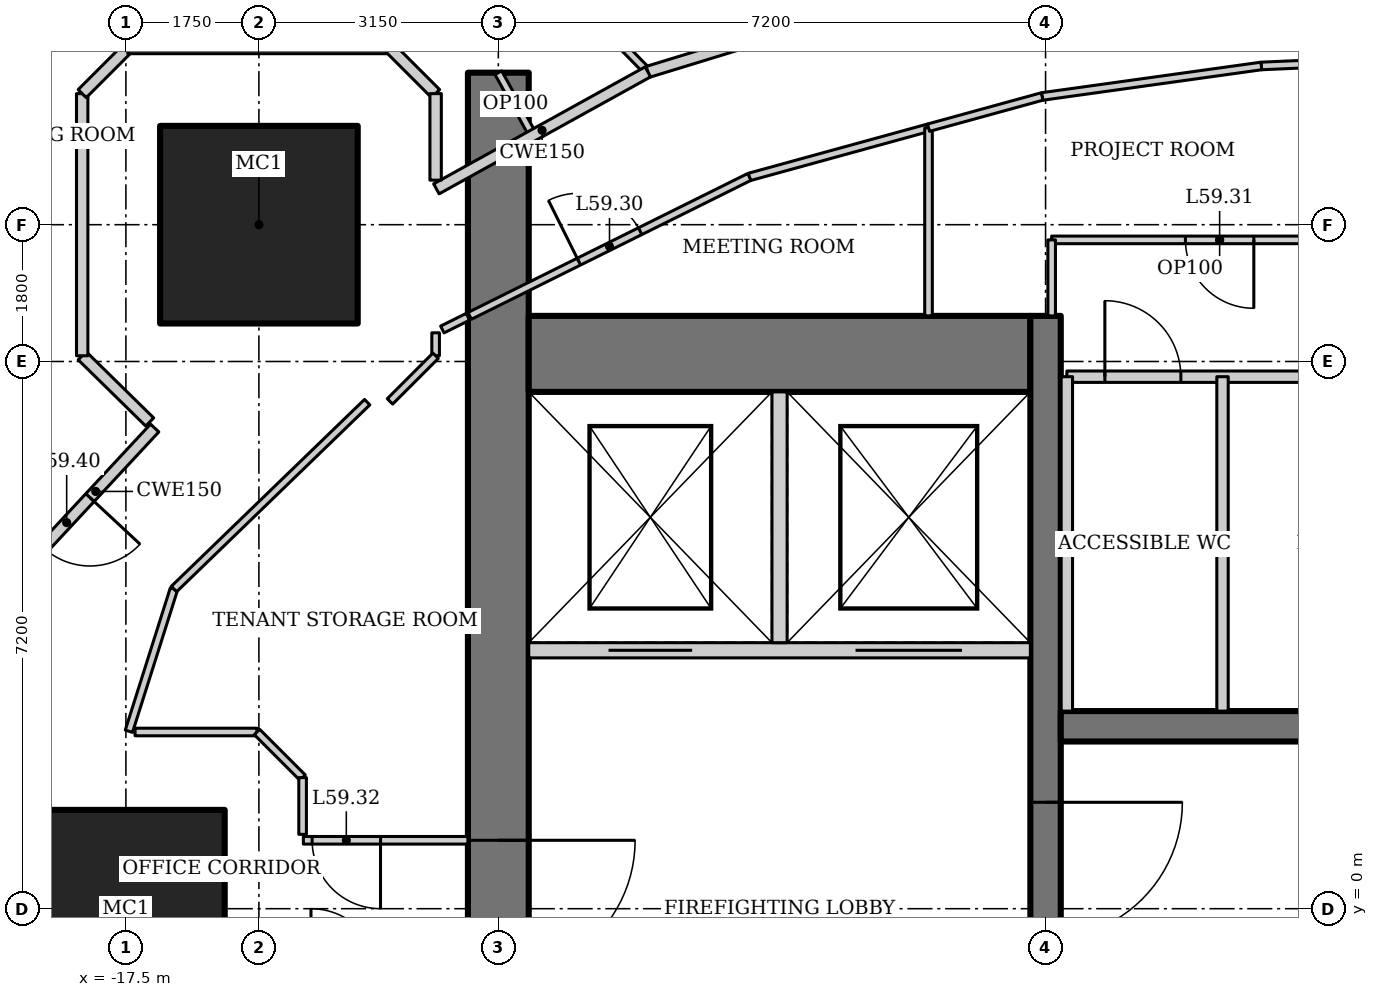
"""IFC4 building model, lengths in metres.
Left out: names, types, materials, properties, quantities, classifications, styles, units other than length and angle.
Written with IfcOpenShell. Run it as: python <this file> out.ifc"""

import sys

from ifc_helpers import new_model, si_unit, direction, frame, frame_2d, origin, origin_2d, place, context, subcontext, project, spatial, rectangle, hollow_rectangle, extrude, element, fill, save


model = new_model("IFC4")
c1 = context("Model", 3, precision=1e-05, world=origin(), true_north=direction((0.0, 1.0)))
c2 = subcontext(c1, "Body", "Model", "MODEL_VIEW")
j1 = project(units=[si_unit("LENGTHUNIT", "METRE"), si_unit("PLANEANGLEUNIT", "RADIAN")], contexts=[c1])
p1 = place(None, origin())
s1 = spatial("IfcSite", under=j1, at=p1, CompositionType="ELEMENT")
p2 = place(p1, origin())
s2 = spatial("IfcBuilding", under=s1, at=p2, CompositionType="ELEMENT")
p3 = place(p2, frame((0.0, 0.0, 253.6)))
s3 = spatial("IfcBuildingStorey", under=s2, at=p3, CompositionType="ELEMENT", Elevation=253.6)
for number, where, z_axis, x_axis in (
    (1, (-15.75, 9.0, 0.0), (0.0, 0.0, 1.0), (1.0, 0.0, 0.0)),
    (2, (-17.5, 0.0, 0.0), (0.0, 0.0, 1.0), (1.0, 0.0, 0.0)),
):
    element("IfcColumn", number, at=place(p3, frame(where, z_axis=z_axis, x_axis=x_axis)), inside=s3, PredefinedType="COLUMN", context=c2, shape_type="SweptSolid", body=[
        extrude(hollow_rectangle(XDim=2.6, YDim=2.6, WallThickness=0.13, at=origin_2d()), origin(), (0.0, 0.0, 1.0), 4.2),
    ])
p4 = place(p3, frame((-12.6, 11.0, 0.0), z_axis=(0.0, 0.0, 1.0), x_axis=(0.0, -1.0, 0.0)))
e3 = element("IfcWall", 3, at=p4, inside=s3, PredefinedType="SHEAR", context=c2, shape_type="SweptSolid", body=[
    extrude(rectangle(XDim=22.0, YDim=0.8, at=frame_2d((11.0, 0.0))), origin(), (0.0, 0.0, 1.0), 4.2),
])
p5 = place(p4, frame((10.1, 0.0, 0.0)))
e4 = element("IfcOpeningElement", 4, at=p5, cuts=e3, PredefinedType="OPENING", context=c2, shape_type="SweptSolid", body=[
    extrude(rectangle(XDim=1.8, YDim=2.1, at=frame_2d((0.9, 1.05))), frame((0.0, 0.41, 0.0), z_axis=(0.0, -1.0, 0.0), x_axis=(1.0, 0.0, 0.0)), (0.0, 0.0, 1.0), 0.82),
])
p6 = place(p3, frame((-5.6, 7.3, 0.0), z_axis=(0.0, 0.0, 1.0), x_axis=(-1.0, 0.0, 0.0)))
e5 = element("IfcWall", 5, at=p6, inside=s3, PredefinedType="SHEAR", context=c2, shape_type="SweptSolid", body=[
    extrude(rectangle(XDim=6.6, YDim=1.0, at=frame_2d((3.3, 0.0))), origin(), (0.0, 0.0, 1.0), 4.2),
])
p7 = place(p3, frame((-5.4, 7.8, 0.0), z_axis=(0.0, 0.0, 1.0), x_axis=(0.0, -1.0, 0.0)))
e6 = element("IfcWall", 6, at=p7, inside=s3, PredefinedType="SHEAR", context=c2, shape_type="SweptSolid", body=[
    extrude(rectangle(XDim=14.6, YDim=0.4, at=frame_2d((7.3, 0.0))), origin(), (0.0, 0.0, 1.0), 4.2),
])
p8 = place(p7, frame((6.4, 0.0, 0.0)))
e7 = element("IfcOpeningElement", 7, at=p8, cuts=e6, PredefinedType="OPENING", context=c2, shape_type="SweptSolid", body=[
    extrude(rectangle(XDim=1.8, YDim=2.1, at=frame_2d((0.9, 1.05))), frame((0.0, 0.21, 0.0), z_axis=(0.0, -1.0, 0.0), x_axis=(1.0, 0.0, 0.0)), (0.0, 0.0, 1.0), 0.42),
])
p9 = place(p3, frame((5.2, 2.4, 0.0), z_axis=(0.0, 0.0, 1.0), x_axis=(-1.0, 0.0, 0.0)))
e8 = element("IfcWall", 8, at=p9, inside=s3, PredefinedType="SHEAR", context=c2, shape_type="SweptSolid", body=[
    extrude(rectangle(XDim=10.4, YDim=0.4, at=frame_2d((5.2, 0.0))), origin(), (0.0, 0.0, 1.0), 4.2),
])
p10 = place(p3, frame((-12.2, 3.4, 0.0), z_axis=(0.0, 0.0, 1.0), x_axis=(1.0, 0.0, 0.0)))
e9 = element("IfcWall", 9, at=p10, inside=s3, PredefinedType="SOLIDWALL", context=c2, shape_type="SweptSolid", body=[
    extrude(rectangle(XDim=6.6, YDim=0.2, at=frame_2d((3.3, 0.0))), origin(), (0.0, 0.0, 1.0), 4.2),
])
p11 = place(p10, frame((1.05, 0.0, 0.0)))
e10 = element("IfcOpeningElement", 10, at=p11, cuts=e9, PredefinedType="OPENING", context=c2, shape_type="SweptSolid", body=[
    extrude(rectangle(XDim=1.1, YDim=2.2, at=frame_2d((0.55, 1.1))), frame((0.0, 0.11, 0.0), z_axis=(0.0, -1.0, 0.0), x_axis=(1.0, 0.0, 0.0)), (0.0, 0.0, 1.0), 0.22),
])
p12 = place(p10, frame((4.3, 0.0, 0.0)))
e11 = element("IfcOpeningElement", 11, at=p12, cuts=e9, PredefinedType="OPENING", context=c2, shape_type="SweptSolid", body=[
    extrude(rectangle(XDim=1.4, YDim=2.2, at=frame_2d((0.7, 1.1))), frame((0.0, 0.11, 0.0), z_axis=(0.0, -1.0, 0.0), x_axis=(1.0, 0.0, 0.0)), (0.0, 0.0, 1.0), 0.22),
])
p13 = place(p3, frame((-8.9, 3.5, 0.0), z_axis=(0.0, 0.0, 1.0), x_axis=(0.0, 1.0, 0.0)))
e12 = element("IfcWall", 12, at=p13, inside=s3, PredefinedType="SOLIDWALL", context=c2, shape_type="SweptSolid", body=[
    extrude(rectangle(XDim=3.3, YDim=0.2, at=frame_2d((1.65, 0.0))), origin(), (0.0, 0.0, 1.0), 4.2),
])
p14 = place(p3, frame((-15.709, 16.199, 0.0), z_axis=(0.0, 0.0, 1.0), x_axis=(0.699362525935, -0.714767135029, 0.0)))
e13 = element("IfcWall", 13, at=p14, inside=s3, PredefinedType="PARTITIONING", context=c2, shape_type="SweptSolid", body=[
    extrude(rectangle(XDim=7.259, YDim=0.1, at=frame_2d((3.629, 0.0))), origin(), (0.0, 0.0, 1.0), 3.41),
])
p15 = place(p3, frame((-6.288, 12.341, 0.0), z_axis=(0.0, 0.0, 1.0), x_axis=(-0.956185837153, -0.292760388079, 0.0)))
e14 = element("IfcWall", 14, at=p15, inside=s3, PredefinedType="PARTITIONING", context=c2, shape_type="SweptSolid", body=[
    extrude(rectangle(XDim=4.544, YDim=0.15, at=frame_2d((2.272, 0.0))), origin(), (0.0, 0.0, 1.0), 4.05),
])
p16 = place(p15, frame((0.15, 0.0, 0.0)))
e15 = element("IfcOpeningElement", 15, at=p16, cuts=e14, PredefinedType="OPENING", context=c2, shape_type="SweptSolid", body=[
    extrude(rectangle(XDim=0.9, YDim=2.1, at=frame_2d((0.45, 1.05))), frame((0.0, 0.085, 0.0), z_axis=(0.0, -1.0, 0.0), x_axis=(1.0, 0.0, 0.0)), (0.0, 0.0, 1.0), 0.17),
])
p17 = place(p3, frame((-5.12, 7.0, 0.0), z_axis=(0.0, 0.0, 1.0), x_axis=(1.0, 0.0, 0.0)))
e16 = element("IfcWall", 16, at=p17, inside=s3, PredefinedType="SOLIDWALL", context=c2, shape_type="SweptSolid", body=[
    extrude(rectangle(XDim=10.24, YDim=0.15, at=frame_2d((5.12, 0.0))), origin(), (0.0, 0.0, 1.0), 4.05),
])
p18 = place(p17, frame((0.5, 0.0, 0.0)))
e17 = element("IfcOpeningElement", 17, at=p18, cuts=e16, PredefinedType="OPENING", context=c2, shape_type="SweptSolid", body=[
    extrude(rectangle(XDim=1.0, YDim=2.1, at=frame_2d((0.5, 1.05))), frame((0.0, 0.085, 0.0), z_axis=(0.0, -1.0, 0.0), x_axis=(1.0, 0.0, 0.0)), (0.0, 0.0, 1.0), 0.17),
])
p19 = place(p17, frame((3.248, 0.0, 0.0)))
e18 = element("IfcOpeningElement", 18, at=p19, cuts=e16, PredefinedType="OPENING", context=c2, shape_type="SweptSolid", body=[
    extrude(rectangle(XDim=0.9, YDim=2.1, at=frame_2d((0.45, 1.05))), frame((0.0, 0.085, 0.0), z_axis=(0.0, -1.0, 0.0), x_axis=(1.0, 0.0, 0.0)), (0.0, 0.0, 1.0), 0.17),
])
p20 = place(p17, frame((6.525, 0.0, 0.0)))
e19 = element("IfcOpeningElement", 19, at=p20, cuts=e16, PredefinedType="OPENING", context=c2, shape_type="SweptSolid", body=[
    extrude(rectangle(XDim=0.9, YDim=2.1, at=frame_2d((0.45, 1.05))), frame((0.0, 0.085, 0.0), z_axis=(0.0, -1.0, 0.0), x_axis=(1.0, 0.0, 0.0)), (0.0, 0.0, 1.0), 0.17),
])
p21 = place(p17, frame((8.952, 0.0, 0.0)))
e20 = element("IfcOpeningElement", 20, at=p21, cuts=e16, PredefinedType="OPENING", context=c2, shape_type="SweptSolid", body=[
    extrude(rectangle(XDim=0.9, YDim=2.1, at=frame_2d((0.45, 1.05))), frame((0.0, 0.085, 0.0), z_axis=(0.0, -1.0, 0.0), x_axis=(1.0, 0.0, 0.0)), (0.0, 0.0, 1.0), 0.17),
])
for number, where, z_axis, x_axis in (
    (21, (-5.12, 2.6, 0.0), (0.0, 0.0, 1.0), (0.0, 1.0, 0.0)),
    (22, (-3.072, 2.6, 0.0), (0.0, 0.0, 1.0), (0.0, 1.0, 0.0)),
):
    element("IfcWall", number, at=place(p3, frame(where, z_axis=z_axis, x_axis=x_axis)), inside=s3, PredefinedType="SOLIDWALL", context=c2, shape_type="SweptSolid", body=[
        extrude(rectangle(XDim=4.4, YDim=0.15, at=frame_2d((2.2, 0.0))), origin(), (0.0, 0.0, 1.0), 4.05),
    ])
p22 = place(p3, frame((-9.298, 9.628, 0.0), z_axis=(0.0, 0.0, 1.0), x_axis=(0.964255150805, 0.264975478385, 0.0)))
e23 = element("IfcWall", 23, at=p22, inside=s3, PredefinedType="PARTITIONING", context=c2, shape_type="SweptSolid", body=[
    extrude(rectangle(XDim=2.445, YDim=0.1, at=frame_2d((1.223, 0.0))), origin(), (0.0, 0.0, 1.0), 4.05),
])
p23 = place(p3, frame((-6.94, 10.276, 0.0), z_axis=(0.0, 0.0, 1.0), x_axis=(0.0, -1.0, 0.0)))
e24 = element("IfcWall", 24, at=p23, inside=s3, PredefinedType="PARTITIONING", context=c2, shape_type="SweptSolid", body=[
    extrude(rectangle(XDim=2.476, YDim=0.1, at=frame_2d((1.238, 0.0))), origin(), (0.0, 0.0, 1.0), 4.05),
])
p24 = place(p3, frame((-12.977, 7.8, 0.0), z_axis=(0.0, 0.0, 1.0), x_axis=(0.895529831139, 0.445001484874, 0.0)))
e25 = element("IfcWall", 25, at=p24, inside=s3, PredefinedType="PARTITIONING", context=c2, shape_type="SweptSolid", body=[
    extrude(rectangle(XDim=4.108, YDim=0.1, at=frame_2d((2.054, 0.0))), origin(), (0.0, 0.0, 1.0), 4.05),
])
p25 = place(p24, frame((1.604, 0.0, 0.0)))
e26 = element("IfcOpeningElement", 26, at=p25, cuts=e25, PredefinedType="OPENING", context=c2, shape_type="SweptSolid", body=[
    extrude(rectangle(XDim=0.9, YDim=2.1, at=frame_2d((0.45, 1.05))), frame((0.0, 0.06, 0.0), z_axis=(0.0, -1.0, 0.0), x_axis=(1.0, 0.0, 0.0)), (0.0, 0.0, 1.0), 0.12),
])
p26 = place(p3, frame((-5.445, 10.687, 0.0), z_axis=(0.0, 0.0, 1.0), x_axis=(0.99045099049, 0.137865280027, 0.0)))
e27 = element("IfcWall", 27, at=p26, inside=s3, PredefinedType="PARTITIONING", context=c2, shape_type="SweptSolid", body=[
    extrude(rectangle(XDim=2.913, YDim=0.1, at=frame_2d((1.457, 0.0))), origin(), (0.0, 0.0, 1.0), 4.05),
])
p27 = place(p3, frame((-2.56, 11.089, 0.0), z_axis=(0.0, 0.0, 1.0), x_axis=(0.999053939397, 0.043488230303, 0.0)))
e28 = element("IfcWall", 28, at=p27, inside=s3, PredefinedType="PARTITIONING", context=c2, shape_type="SweptSolid", body=[
    extrude(rectangle(XDim=1.662, YDim=0.1, at=frame_2d((0.831, 0.0))), origin(), (0.0, 0.0, 1.0), 4.05),
])
p28 = place(p3, frame((-0.9, 8.8, 0.0), z_axis=(0.0, 0.0, 1.0), x_axis=(-1.0, 0.0, 0.0)))
e29 = element("IfcWall", 29, at=p28, inside=s3, PredefinedType="PARTITIONING", context=c2, shape_type="SweptSolid", body=[
    extrude(rectangle(XDim=4.42, YDim=0.1, at=frame_2d((2.21, 0.0))), origin(), (0.0, 0.0, 1.0), 4.05),
])
p29 = place(p28, frame((1.76, 0.0, 0.0)))
e30 = element("IfcOpeningElement", 30, at=p29, cuts=e29, PredefinedType="OPENING", context=c2, shape_type="SweptSolid", body=[
    extrude(rectangle(XDim=0.9, YDim=2.1, at=frame_2d((0.45, 1.05))), frame((0.0, 0.06, 0.0), z_axis=(0.0, -1.0, 0.0), x_axis=(1.0, 0.0, 0.0)), (0.0, 0.0, 1.0), 0.12),
])
p30 = place(p3, frame((-5.32, 8.8, 0.0), z_axis=(0.0, 0.0, 1.0), x_axis=(0.0, -1.0, 0.0)))
e31 = element("IfcWall", 31, at=p30, inside=s3, PredefinedType="PARTITIONING", context=c2, shape_type="SweptSolid", body=[
    extrude(rectangle(XDim=1.0, YDim=0.1, at=frame_2d((0.5, 0.0))), origin(), (0.0, 0.0, 1.0), 4.05),
])
p31 = place(p3, frame((-6.94, 10.276, 0.0), z_axis=(0.0, 0.0, 1.0), x_axis=(0.964227536736, 0.265075946476, 0.0)))
e32 = element("IfcWall", 32, at=p31, inside=s3, PredefinedType="PARTITIONING", context=c2, shape_type="SweptSolid", body=[
    extrude(rectangle(XDim=1.55, YDim=0.1, at=frame_2d((0.775, 0.0))), origin(), (0.0, 0.0, 1.0), 4.05),
])
p32 = place(p3, frame((-13.337, 7.621, 0.0), z_axis=(0.0, 0.0, 1.0), x_axis=(0.895721570004, 0.444615416995, 0.0)))
e33 = element("IfcWall", 33, at=p32, inside=s3, PredefinedType="PARTITIONING", context=c2, shape_type="SweptSolid", body=[
    extrude(rectangle(XDim=0.376, YDim=0.1, at=frame_2d((0.188, 0.0))), origin(), (0.0, 0.0, 1.0), 4.05),
])
p33 = place(p3, frame((-12.6, 11.0, 0.0), z_axis=(0.0, 0.0, 1.0), x_axis=(0.484103558985, -0.875010710893, 0.0)))
e34 = element("IfcWall", 34, at=p33, inside=s3, PredefinedType="PARTITIONING", context=c2, shape_type="SweptSolid", body=[
    extrude(rectangle(XDim=0.943, YDim=0.1, at=frame_2d((0.472, 0.0))), origin(), (0.0, 0.0, 1.0), 4.05),
])
p34 = place(p3, frame((-13.0, 0.9, 0.0), z_axis=(0.0, 0.0, 1.0), x_axis=(-1.0, 0.0, 0.0)))
e35 = element("IfcWall", 35, at=p34, inside=s3, PredefinedType="PARTITIONING", context=c2, shape_type="SweptSolid", body=[
    extrude(rectangle(XDim=2.165, YDim=0.1, at=frame_2d((1.083, 0.0))), origin(), (0.0, 0.0, 1.0), 4.05),
])
p35 = place(p34, frame((1.15, 0.0, 0.0)))
e36 = element("IfcOpeningElement", 36, at=p35, cuts=e35, PredefinedType="OPENING", context=c2, shape_type="SweptSolid", body=[
    extrude(rectangle(XDim=0.9, YDim=2.1, at=frame_2d((0.45, 1.05))), frame((0.0, 0.06, 0.0), z_axis=(0.0, -1.0, 0.0), x_axis=(1.0, 0.0, 0.0)), (0.0, 0.0, 1.0), 0.12),
])
p36 = place(p3, frame((-17.46, 2.335, 0.0), z_axis=(0.0, 0.0, 1.0), x_axis=(0.301821975729, 0.953364303384, 0.0)))
e37 = element("IfcWall", 37, at=p36, inside=s3, PredefinedType="PARTITIONING", context=c2, shape_type="SweptSolid", body=[
    extrude(rectangle(XDim=1.962, YDim=0.1, at=frame_2d((0.981, 0.0))), origin(), (0.0, 0.0, 1.0), 4.05),
])
p37 = place(p3, frame((-17.38, 2.325, 0.0), z_axis=(0.0, 0.0, 1.0), x_axis=(1.0, 0.0, 0.0)))
e38 = element("IfcWall", 38, at=p37, inside=s3, PredefinedType="PARTITIONING", context=c2, shape_type="SweptSolid", body=[
    extrude(rectangle(XDim=1.604, YDim=0.1, at=frame_2d((0.802, 0.0))), origin(), (0.0, 0.0, 1.0), 4.05),
])
p38 = place(p3, frame((-15.775, 2.325, 0.0), z_axis=(0.0, 0.0, 1.0), x_axis=(0.707106781187, -0.707106781187, 0.0)))
e39 = element("IfcWall", 39, at=p38, inside=s3, PredefinedType="PARTITIONING", context=c2, shape_type="SweptSolid", body=[
    extrude(rectangle(XDim=0.849, YDim=0.1, at=frame_2d((0.425, 0.0))), origin(), (0.0, 0.0, 1.0), 4.05),
])
p39 = place(p3, frame((-15.175, 1.725, 0.0), z_axis=(0.0, 0.0, 1.0), x_axis=(0.0, -1.0, 0.0)))
e40 = element("IfcWall", 40, at=p39, inside=s3, PredefinedType="PARTITIONING", context=c2, shape_type="SweptSolid", body=[
    extrude(rectangle(XDim=0.746, YDim=0.1, at=frame_2d((0.373, 0.0))), origin(), (0.0, 0.0, 1.0), 4.05),
])
p40 = place(p3, frame((-10.633, 11.01, 0.0), z_axis=(0.0, 0.0, 1.0), x_axis=(-0.875072100837, -0.483992580869, 0.0)))
e41 = element("IfcWall", 41, at=p40, inside=s3, PredefinedType="PARTITIONING", context=c2, shape_type="SweptSolid", body=[
    extrude(rectangle(XDim=3.179, YDim=0.15, at=frame_2d((1.59, 0.0))), origin(), (0.0, 0.0, 1.0), 4.05),
])
p41 = place(p3, frame((-17.121, 6.325, 0.0), z_axis=(0.0, 0.0, 1.0), x_axis=(-0.680985069419, -0.732297299755, 0.0)))
e42 = element("IfcWall", 42, at=p41, inside=s3, PredefinedType="PARTITIONING", context=c2, shape_type="SweptSolid", body=[
    extrude(rectangle(XDim=2.279, YDim=0.15, at=frame_2d((1.14, 0.0))), origin(), (0.0, 0.0, 1.0), 4.05),
])
p42 = place(p41, frame((1.25, 0.0, 0.0)))
e43 = element("IfcOpeningElement", 43, at=p42, cuts=e42, PredefinedType="OPENING", context=c2, shape_type="SweptSolid", body=[
    extrude(rectangle(XDim=0.9, YDim=2.1, at=frame_2d((0.45, 1.05))), frame((0.0, 0.085, 0.0), z_axis=(0.0, -1.0, 0.0), x_axis=(1.0, 0.0, 0.0)), (0.0, 0.0, 1.0), 0.17),
])
p43 = place(p3, frame((-16.868, 4.206, 0.0), z_axis=(0.0, 0.0, 1.0), x_axis=(0.718810161381, 0.695206409562, 0.0)))
e44 = element("IfcWall", 44, at=p43, inside=s3, PredefinedType="PARTITIONING", context=c2, shape_type="SweptSolid", body=[
    extrude(rectangle(XDim=3.537, YDim=0.1, at=frame_2d((1.769, 0.0))), origin(), (0.0, 0.0, 1.0), 4.05),
])
p44 = place(p3, frame((-13.425, 7.578, 0.0), z_axis=(0.0, 0.0, 1.0), x_axis=(0.0, -1.0, 0.0)))
e45 = element("IfcWall", 45, at=p44, inside=s3, PredefinedType="PARTITIONING", context=c2, shape_type="SweptSolid", body=[
    extrude(rectangle(XDim=0.302, YDim=0.1, at=frame_2d((0.151, 0.0))), origin(), (0.0, 0.0, 1.0), 4.05),
])
p45 = place(p3, frame((-13.425, 7.275, 0.0), z_axis=(0.0, 0.0, 1.0), x_axis=(-0.707106781187, -0.707106781187, 0.0)))
e46 = element("IfcWall", 46, at=p45, inside=s3, PredefinedType="PARTITIONING", context=c2, shape_type="SweptSolid", body=[
    extrude(rectangle(XDim=0.849, YDim=0.1, at=frame_2d((0.425, 0.0))), origin(), (0.0, 0.0, 1.0), 4.05),
])
p46 = place(p3, frame((-17.187, 6.404, 0.0), z_axis=(0.0, 0.0, 1.0), x_axis=(-0.713842064016, 0.700306723973, 0.0)))
e47 = element("IfcWall", 47, at=p46, inside=s3, PredefinedType="PARTITIONING", context=c2, shape_type="SweptSolid", body=[
    extrude(rectangle(XDim=1.245, YDim=0.15, at=frame_2d((0.622, 0.0))), origin(), (0.0, 0.0, 1.0), 4.05),
])
p47 = place(p3, frame((-18.075, 7.275, 0.0), z_axis=(0.0, 0.0, 1.0), x_axis=(0.0, 1.0, 0.0)))
e48 = element("IfcWall", 48, at=p47, inside=s3, PredefinedType="PARTITIONING", context=c2, shape_type="SweptSolid", body=[
    extrude(rectangle(XDim=3.449, YDim=0.15, at=frame_2d((1.725, 0.0))), origin(), (0.0, 0.0, 1.0), 3.6),
])
p48 = place(p3, frame((-18.075, 10.725, 0.0), z_axis=(0.0, 0.0, 1.0), x_axis=(0.707106781187, 0.707106781187, 0.0)))
e49 = element("IfcWall", 49, at=p48, inside=s3, PredefinedType="PARTITIONING", context=c2, shape_type="SweptSolid", body=[
    extrude(rectangle(XDim=0.849, YDim=0.15, at=frame_2d((0.425, 0.0))), origin(), (0.0, 0.0, 1.0), 4.05),
])
p49 = place(p3, frame((-17.475, 11.325, 0.0), z_axis=(0.0, 0.0, 1.0), x_axis=(1.0, 0.0, 0.0)))
e50 = element("IfcWall", 50, at=p49, inside=s3, PredefinedType="PARTITIONING", context=c2, shape_type="SweptSolid", body=[
    extrude(rectangle(XDim=3.449, YDim=0.15, at=frame_2d((1.725, 0.0))), origin(), (0.0, 0.0, 1.0), 4.05),
])
p50 = place(p3, frame((-14.025, 11.325, 0.0), z_axis=(0.0, 0.0, 1.0), x_axis=(0.707106781187, -0.707106781187, 0.0)))
e51 = element("IfcWall", 51, at=p50, inside=s3, PredefinedType="PARTITIONING", context=c2, shape_type="SweptSolid", body=[
    extrude(rectangle(XDim=0.849, YDim=0.15, at=frame_2d((0.425, 0.0))), origin(), (0.0, 0.0, 1.0), 4.05),
])
p51 = place(p3, frame((-13.425, 10.725, 0.0), z_axis=(0.0, 0.0, 1.0), x_axis=(0.0, -1.0, 0.0)))
e52 = element("IfcWall", 52, at=p51, inside=s3, PredefinedType="PARTITIONING", context=c2, shape_type="SweptSolid", body=[
    extrude(rectangle(XDim=1.138, YDim=0.15, at=frame_2d((0.569, 0.0))), origin(), (0.0, 0.0, 1.0), 4.05),
])
p52 = place(p8, origin())
e53 = element("IfcDoor", 53, at=p52, inside=s3, OperationType="DOUBLE_DOOR_DOUBLE_SWING", PredefinedType="DOOR", context=c2, shape_type="SweptSolid", body=[
    extrude(rectangle(XDim=1.8, YDim=2.1, at=frame_2d((0.9, 1.05))), frame((0.0, 0.025, 0.0), z_axis=(0.0, -1.0, 0.0), x_axis=(1.0, 0.0, 0.0)), (0.0, 0.0, 1.0), 0.05),
])
fill(e7, e53)
p53 = place(p5, origin())
e54 = element("IfcDoor", 54, at=p53, inside=s3, OperationType="DOUBLE_DOOR_DOUBLE_SWING", PredefinedType="DOOR", context=c2, shape_type="SweptSolid", body=[
    extrude(rectangle(XDim=1.8, YDim=2.1, at=frame_2d((0.9, 1.05))), frame((0.0, 0.025, 0.0), z_axis=(0.0, -1.0, 0.0), x_axis=(1.0, 0.0, 0.0)), (0.0, 0.0, 1.0), 0.05),
])
fill(e4, e54)
p54 = place(p11, origin())
e55 = element("IfcDoor", 55, at=p54, inside=s3, OperationType="DOUBLE_DOOR_SLIDING", PredefinedType="DOOR", context=c2, shape_type="SweptSolid", body=[
    extrude(rectangle(XDim=1.1, YDim=2.2, at=frame_2d((0.55, 1.1))), frame((0.0, 0.025, 0.0), z_axis=(0.0, -1.0, 0.0), x_axis=(1.0, 0.0, 0.0)), (0.0, 0.0, 1.0), 0.05),
])
fill(e10, e55)
p55 = place(p12, origin())
e56 = element("IfcDoor", 56, at=p55, inside=s3, OperationType="DOUBLE_DOOR_SLIDING", PredefinedType="DOOR", context=c2, shape_type="SweptSolid", body=[
    extrude(rectangle(XDim=1.4, YDim=2.2, at=frame_2d((0.7, 1.1))), frame((0.0, 0.025, 0.0), z_axis=(0.0, -1.0, 0.0), x_axis=(1.0, 0.0, 0.0)), (0.0, 0.0, 1.0), 0.05),
])
fill(e11, e56)
p56 = place(p18, origin())
e57 = element("IfcDoor", 57, at=p56, inside=s3, OperationType="SINGLE_SWING_LEFT", PredefinedType="DOOR", context=c2, shape_type="SweptSolid", body=[
    extrude(rectangle(XDim=1.0, YDim=2.1, at=frame_2d((0.5, 1.05))), frame((0.0, 0.025, 0.0), z_axis=(0.0, -1.0, 0.0), x_axis=(1.0, 0.0, 0.0)), (0.0, 0.0, 1.0), 0.05),
])
fill(e17, e57)
p57 = place(p25, origin())
e58 = element("IfcDoor", 58, at=p57, inside=s3, OperationType="SINGLE_SWING_LEFT", PredefinedType="DOOR", context=c2, shape_type="SweptSolid", body=[
    extrude(rectangle(XDim=0.9, YDim=2.1, at=frame_2d((0.45, 1.05))), frame((0.0, 0.025, 0.0), z_axis=(0.0, -1.0, 0.0), x_axis=(1.0, 0.0, 0.0)), (0.0, 0.0, 1.0), 0.05),
])
fill(e26, e58)
p58 = place(p29, origin())
e59 = element("IfcDoor", 59, at=p58, inside=s3, OperationType="SINGLE_SWING_LEFT", PredefinedType="DOOR", context=c2, shape_type="SweptSolid", body=[
    extrude(rectangle(XDim=0.9, YDim=2.1, at=frame_2d((0.45, 1.05))), frame((0.0, 0.025, 0.0), z_axis=(0.0, -1.0, 0.0), x_axis=(1.0, 0.0, 0.0)), (0.0, 0.0, 1.0), 0.05),
])
fill(e30, e59)
p59 = place(p35, origin())
e60 = element("IfcDoor", 60, at=p59, inside=s3, OperationType="SINGLE_SWING_LEFT", PredefinedType="DOOR", context=c2, shape_type="SweptSolid", body=[
    extrude(rectangle(XDim=0.9, YDim=2.1, at=frame_2d((0.45, 1.05))), frame((0.0, 0.025, 0.0), z_axis=(0.0, -1.0, 0.0), x_axis=(1.0, 0.0, 0.0)), (0.0, 0.0, 1.0), 0.05),
])
fill(e36, e60)
p60 = place(p42, origin())
e61 = element("IfcDoor", 61, at=p60, inside=s3, OperationType="SINGLE_SWING_LEFT", PredefinedType="DOOR", context=c2, shape_type="SweptSolid", body=[
    extrude(rectangle(XDim=0.9, YDim=2.1, at=frame_2d((0.45, 1.05))), frame((0.0, 0.025, 0.0), z_axis=(0.0, -1.0, 0.0), x_axis=(1.0, 0.0, 0.0)), (0.0, 0.0, 1.0), 0.05),
])
fill(e43, e61)
save(model, sys.argv[1])
